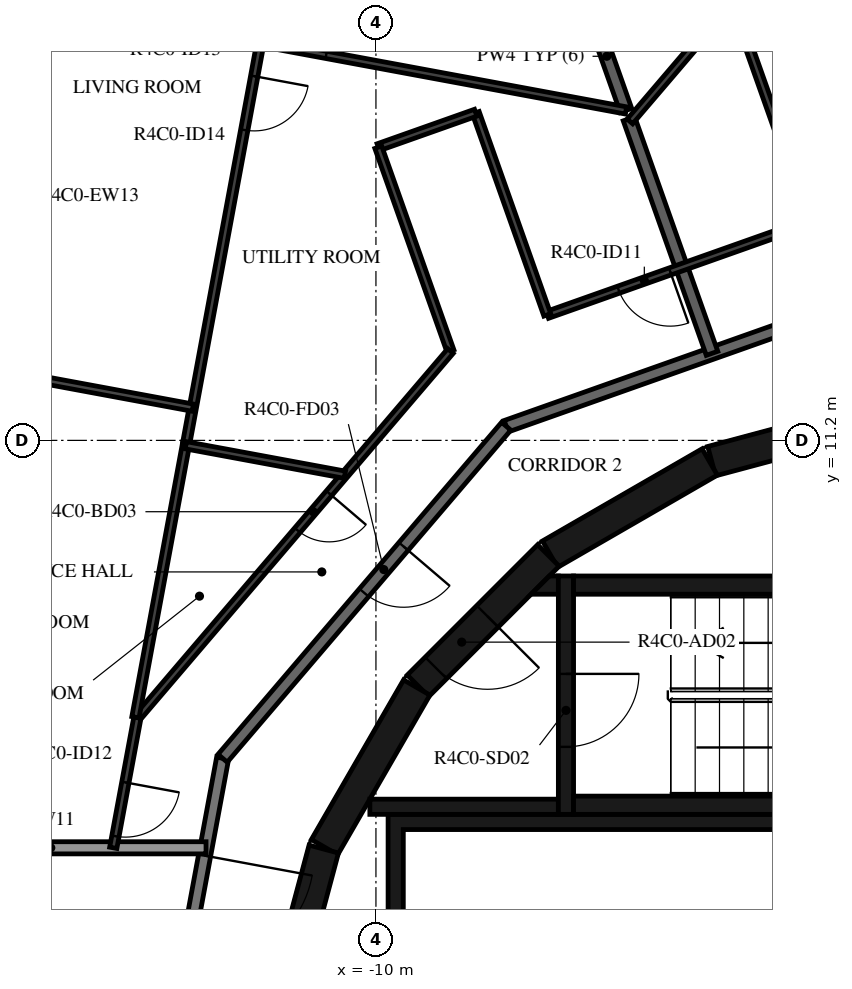
"""IFC4 building model, lengths in metres.
Left out: names, types, materials, properties, quantities, classifications, styles, units other than length and angle.
Written with IfcOpenShell. Run it as: python <this file> out.ifc"""

import sys

from ifc_helpers import new_model, si_unit, direction, frame, frame_2d, origin, place, context, subcontext, project, spatial, polyline, rectangle, outline, extrude, element, fill, save


model = new_model("IFC4")
c1 = context("Model", 3, precision=1e-05, world=origin(), true_north=direction((0.0, 1.0)))
c2 = subcontext(c1, "Body", "Model", "MODEL_VIEW")
j1 = project(units=[si_unit("LENGTHUNIT", "METRE"), si_unit("PLANEANGLEUNIT", "RADIAN")], contexts=[c1])
p1 = place(None, origin())
s1 = spatial("IfcSite", under=j1, at=p1, CompositionType="ELEMENT")
p2 = place(p1, origin())
s2 = spatial("IfcBuilding", under=s1, at=p2, CompositionType="ELEMENT")
p3 = place(p2, frame((0.0, 0.0, 172.7)))
s3 = spatial("IfcBuildingStorey", under=s2, at=p3, CompositionType="ELEMENT", Elevation=172.7)
for number, where, z_axis, x_axis in (
    (1, (-1.55, 11.643, 0.0), (0.0, 0.0, 1.0), (-0.966, -0.259, 0.0)),
    (2, (-4.51, 10.845, 0.0), (0.0, 0.0, 1.0), (-0.866, -0.5, 0.0)),
):
    element("IfcWall", number, at=place(p3, frame(where, z_axis=z_axis, x_axis=x_axis)), inside=s3, PredefinedType="SHEAR", context=c2, shape_type="SweptSolid", body=[
        extrude(rectangle(XDim=3.033, YDim=0.5, at=frame_2d((1.516, 0.0))), origin(), (0.0, 0.0, 1.0), 3.12),
    ])
p4 = place(p3, frame((-7.164, 9.308, 0.0), z_axis=(0.0, 0.0, 1.0), x_axis=(-0.707106781187, -0.707106781187, 0.0)))
e3 = element("IfcWall", 3, at=p4, inside=s3, PredefinedType="SHEAR", context=c2, shape_type="SweptSolid", body=[
    extrude(rectangle(XDim=3.032, YDim=0.5, at=frame_2d((1.516, 0.0))), origin(), (0.0, 0.0, 1.0), 3.12),
])
p5 = place(p4, frame((1.416, 0.0, 0.0)))
e4 = element("IfcOpeningElement", 4, at=p5, cuts=e3, PredefinedType="OPENING", context=c2, shape_type="SweptSolid", body=[
    extrude(rectangle(XDim=1.2, YDim=2.1, at=frame_2d((0.6, 1.05))), frame((0.0, 0.26, 0.0), z_axis=(0.0, -1.0, 0.0), x_axis=(1.0, 0.0, 0.0)), (0.0, 0.0, 1.0), 0.52),
])
for number, where, z_axis, x_axis in (
    (5, (-9.329, 7.137, 0.0), (0.0, 0.0, 1.0), (-0.5, -0.866, 0.0)),
    (6, (-10.858, 4.479, 0.0), (0.0, 0.0, 1.0), (-0.259, -0.966, 0.0)),
):
    element("IfcWall", number, at=place(p3, frame(where, z_axis=z_axis, x_axis=x_axis)), inside=s3, PredefinedType="SHEAR", context=c2, shape_type="SweptSolid", body=[
        extrude(rectangle(XDim=3.033, YDim=0.5, at=frame_2d((1.516, 0.0))), origin(), (0.0, 0.0, 1.0), 3.12),
    ])
for number, where, z_axis, x_axis in (
    (7, (-6.75, 5.2, 0.0), (0.0, 0.0, 1.0), (1.0, 0.0, 0.0)),
    (8, (-6.75, 8.82, 0.0), (0.0, 0.0, 1.0), (1.0, 0.0, 0.0)),
):
    element("IfcWall", number, at=place(p3, frame(where, z_axis=z_axis, x_axis=x_axis)), inside=s3, PredefinedType="SHEAR", context=c2, shape_type="SweptSolid", body=[
        extrude(rectangle(XDim=6.75, YDim=0.3, at=frame_2d((3.375, 0.0))), origin(), (0.0, 0.0, 1.0), 3.12),
    ])
p6 = place(p3, frame((-6.875, 8.97, 0.0), z_axis=(0.0, 0.0, 1.0), x_axis=(0.0, -1.0, 0.0)))
e9 = element("IfcWall", 9, at=p6, inside=s3, PredefinedType="SHEAR", context=c2, shape_type="SweptSolid", body=[
    extrude(rectangle(XDim=3.92, YDim=0.25, at=frame_2d((1.96, 0.0))), origin(), (0.0, 0.0, 1.0), 3.12),
])
p7 = place(p6, frame((1.61, 0.0, 0.0)))
e10 = element("IfcOpeningElement", 10, at=p7, cuts=e9, PredefinedType="OPENING", context=c2, shape_type="SweptSolid", body=[
    extrude(rectangle(XDim=1.2, YDim=2.1, at=frame_2d((0.6, 1.05))), frame((0.0, 0.135, 0.0), z_axis=(0.0, -1.0, 0.0), x_axis=(1.0, 0.0, 0.0)), (0.0, 0.0, 1.0), 0.27),
])
p8 = place(p3, frame((-7.0, 5.175, 0.0), z_axis=(0.0, 0.0, 1.0), x_axis=(-1.0, 0.0, 0.0)))
e11 = element("IfcWall", 11, at=p8, inside=s3, PredefinedType="SHEAR", context=c2, shape_type="SweptSolid", body=[
    extrude(rectangle(XDim=3.1, YDim=0.25, at=frame_2d((1.55, 0.0))), origin(), (0.0, 0.0, 1.0), 3.12),
])
p9 = place(p3, origin())
e12 = element("IfcWall", 12, at=p9, inside=s3, PredefinedType="SHEAR", context=c2, shape_type="SweptSolid", body=[
    extrude(outline(polyline([(-7.148, 8.97), (-7.0, 8.97), (-7.0, 8.67), (-7.448, 8.67), (-7.148, 8.97)])), origin(), (0.0, 0.0, 1.0), 3.12),
])
p10 = place(p3, origin())
e13 = element("IfcWall", 13, at=p10, inside=s3, PredefinedType="SHEAR", context=c2, shape_type="SweptSolid", body=[
    extrude(outline(polyline([(-9.55, 4.8), (-1.2, 4.8), (-1.2, 1.9), (-0.95, 1.9), (-0.95, 4.8), (0.95, 4.8), (0.95, 1.9), (1.2, 1.9), (1.2, 4.8), (3.1, 4.8), (3.1, 1.9), (3.35, 1.9), (3.35, 4.8), (5.25, 4.8), (5.25, 1.9), (5.5, 1.9), (5.5, 4.8), (7.4, 4.8), (7.4, 1.9), (7.65, 1.9), (7.65, 4.8), (9.55, 4.8), (9.55, 1.9), (9.8, 1.9), (9.8, 4.8), (9.8, 5.05), (-9.8, 5.05), (-9.8, 4.8), (-9.8, 1.9), (-9.55, 1.9), (-9.55, 4.8)])), origin(), (0.0, 0.0, 1.0), 3.12),
])
p11 = place(p3, frame((-12.521, 5.972, 0.0), z_axis=(0.0, 0.0, 1.0), x_axis=(-0.182251559718, -0.983251935661, 0.0)))
e14 = element("IfcWall", 14, at=p11, inside=s3, PredefinedType="STANDARD", context=c2, shape_type="SweptSolid", body=[
    extrude(rectangle(XDim=5.117, YDim=0.2, at=frame_2d((2.559, 0.0))), origin(), (0.0, 0.0, 1.0), 3.12),
])
p12 = place(p11, frame((1.627, 0.0, 0.0)))
e15 = element("IfcOpeningElement", 15, at=p12, cuts=e14, PredefinedType="OPENING", context=c2, shape_type="SweptSolid", body=[
    extrude(rectangle(XDim=1.8, YDim=2.1, at=frame_2d((0.9, 1.05))), frame((0.0, 0.11, 0.0), z_axis=(0.0, -1.0, 0.0), x_axis=(1.0, 0.0, 0.0)), (0.0, 0.0, 1.0), 0.22),
])
p13 = place(p3, frame((-2.359, 13.38, 0.0), z_axis=(0.0, 0.0, 1.0), x_axis=(-0.942647529236, -0.333789807551, 0.0)))
e16 = element("IfcWall", 16, at=p13, inside=s3, PredefinedType="STANDARD", context=c2, shape_type="SweptSolid", body=[
    extrude(rectangle(XDim=5.833, YDim=0.2, at=frame_2d((2.917, 0.0))), origin(), (0.0, 0.0, 1.0), 3.12),
])
p14 = place(p3, frame((-7.858, 11.433, 0.0), z_axis=(0.0, 0.0, 1.0), x_axis=(-0.649440801937, -0.760412154545, 0.0)))
e17 = element("IfcWall", 17, at=p14, inside=s3, PredefinedType="STANDARD", context=c2, shape_type="SweptSolid", body=[
    extrude(rectangle(XDim=7.181, YDim=0.2, at=frame_2d((3.59, 0.0))), origin(), (0.0, 0.0, 1.0), 3.12),
])
p15 = place(p14, frame((2.6, 0.0, 0.0)))
e18 = element("IfcOpeningElement", 18, at=p15, cuts=e17, PredefinedType="OPENING", context=c2, shape_type="SweptSolid", body=[
    extrude(rectangle(XDim=1.0, YDim=2.1, at=frame_2d((0.5, 1.05))), frame((0.0, 0.11, 0.0), z_axis=(0.0, -1.0, 0.0), x_axis=(1.0, 0.0, 0.0)), (0.0, 0.0, 1.0), 0.22),
])
p16 = place(p3, frame((-12.794, 4.5, 0.0), z_axis=(0.0, 0.0, 1.0), x_axis=(-1.0, 0.0, 0.0)))
e19 = element("IfcWall", 19, at=p16, inside=s3, PredefinedType="STANDARD", context=c2, shape_type="SweptSolid", body=[
    extrude(rectangle(XDim=5.106, YDim=0.2, at=frame_2d((2.553, 0.0))), origin(), (0.0, 0.0, 1.0), 2.73),
])
p17 = place(p3, frame((-5.839, 16.488, 0.0), z_axis=(0.0, 0.0, 1.0), x_axis=(0.333840515054, -0.942629572265, 0.0)))
e20 = element("IfcWall", 20, at=p17, inside=s3, PredefinedType="STANDARD", context=c2, shape_type="SweptSolid", body=[
    extrude(rectangle(XDim=4.092, YDim=0.2, at=frame_2d((2.046, 0.0))), origin(), (0.0, 0.0, 1.0), 3.12),
])
p18 = place(p3, frame((-6.518, 18.408, 0.0), z_axis=(0.0, 0.0, 1.0), x_axis=(0.333725210903, -0.942670400303, 0.0)))
e21 = element("IfcWall", 21, at=p18, inside=s3, PredefinedType="STANDARD", context=c2, shape_type="SweptSolid", body=[
    extrude(rectangle(XDim=1.89, YDim=0.2, at=frame_2d((0.945, 0.0))), origin(), (0.0, 0.0, 1.0), 3.12),
])
p19 = place(p3, frame((8.702, 12.206, 0.0), z_axis=(0.0, 0.0, 1.0), x_axis=(-0.760401313718, 0.649453494945, 0.0)))
e22 = element("IfcWall", 22, at=p19, inside=s3, PredefinedType="PARTITIONING", context=c2, shape_type="SweptSolid", body=[
    extrude(rectangle(XDim=16.724, YDim=0.12, at=frame_2d((8.362, 0.0))), origin(), (0.0, 0.0, 1.0), 3.12),
])
p20 = place(p19, frame((0.2, 0.0, 0.0)))
e23 = element("IfcOpeningElement", 23, at=p20, cuts=e22, PredefinedType="OPENING", context=c2, shape_type="SweptSolid", body=[
    extrude(rectangle(XDim=0.9, YDim=2.1, at=frame_2d((0.45, 1.05))), frame((0.0, 0.07, 0.0), z_axis=(0.0, -1.0, 0.0), x_axis=(1.0, 0.0, 0.0)), (0.0, 0.0, 1.0), 0.14),
])
p21 = place(p19, frame((8.02, 0.0, 0.0)))
e24 = element("IfcOpeningElement", 24, at=p21, cuts=e22, PredefinedType="OPENING", context=c2, shape_type="SweptSolid", body=[
    extrude(rectangle(XDim=0.9, YDim=2.1, at=frame_2d((0.45, 1.05))), frame((0.0, 0.07, 0.0), z_axis=(0.0, -1.0, 0.0), x_axis=(1.0, 0.0, 0.0)), (0.0, 0.0, 1.0), 0.14),
])
p22 = place(p19, frame((14.412, 0.0, 0.0)))
e25 = element("IfcOpeningElement", 25, at=p22, cuts=e22, PredefinedType="OPENING", context=c2, shape_type="SweptSolid", body=[
    extrude(rectangle(XDim=0.9, YDim=2.1, at=frame_2d((0.45, 1.05))), frame((0.0, 0.07, 0.0), z_axis=(0.0, -1.0, 0.0), x_axis=(1.0, 0.0, 0.0)), (0.0, 0.0, 1.0), 0.14),
])
p23 = place(p3, frame((-4.021, 18.101, 0.0), z_axis=(0.0, 0.0, 1.0), x_axis=(0.333811035895, -0.942640012048, 0.0)))
e26 = element("IfcWall", 26, at=p23, inside=s3, PredefinedType="PARTITIONING", context=c2, shape_type="SweptSolid", body=[
    extrude(rectangle(XDim=3.505, YDim=0.12, at=frame_2d((1.752, 0.0))), origin(), (0.0, 0.0, 1.0), 3.12),
])
p24 = place(p3, frame((-2.852, 14.797, 0.0), z_axis=(0.0, 0.0, 1.0), x_axis=(-0.942629664375, -0.333840254973, 0.0)))
e27 = element("IfcWall", 27, at=p24, inside=s3, PredefinedType="PARTITIONING", context=c2, shape_type="SweptSolid", body=[
    extrude(rectangle(XDim=4.593, YDim=0.12, at=frame_2d((2.297, 0.0))), origin(), (0.0, 0.0, 1.0), 3.12),
])
p25 = place(p24, frame((2.451, 0.0, 0.0)))
e28 = element("IfcOpeningElement", 28, at=p25, cuts=e27, PredefinedType="OPENING", context=c2, shape_type="SweptSolid", body=[
    extrude(rectangle(XDim=0.9, YDim=2.1, at=frame_2d((0.45, 1.05))), frame((0.0, 0.07, 0.0), z_axis=(0.0, -1.0, 0.0), x_axis=(1.0, 0.0, 0.0)), (0.0, 0.0, 1.0), 0.14),
])
p26 = place(p3, frame((-1.79, 21.167, 0.0), z_axis=(0.0, 0.0, 1.0), x_axis=(-0.649456490412, -0.7603987553, 0.0)))
e29 = element("IfcWall", 29, at=p26, inside=s3, PredefinedType="PARTITIONING", context=c2, shape_type="SweptSolid", body=[
    extrude(rectangle(XDim=6.21, YDim=0.12, at=frame_2d((3.105, 0.0))), origin(), (0.0, 0.0, 1.0), 3.12),
])
p27 = place(p26, frame((0.2, 0.0, 0.0)))
e30 = element("IfcOpeningElement", 30, at=p27, cuts=e29, PredefinedType="OPENING", context=c2, shape_type="SweptSolid", body=[
    extrude(rectangle(XDim=0.9, YDim=2.1, at=frame_2d((0.45, 1.05))), frame((0.0, 0.07, 0.0), z_axis=(0.0, -1.0, 0.0), x_axis=(1.0, 0.0, 0.0)), (0.0, 0.0, 1.0), 0.14),
])
p28 = place(p3, frame((-7.181, 13.263, 0.0), z_axis=(0.0, 0.0, 1.0), x_axis=(-0.333822798183, 0.942635846663, 0.0)))
e31 = element("IfcWall", 31, at=p28, inside=s3, PredefinedType="PARTITIONING", context=c2, shape_type="SweptSolid", body=[
    extrude(rectangle(XDim=3.527, YDim=0.12, at=frame_2d((1.764, 0.0))), origin(), (0.0, 0.0, 1.0), 3.12),
])
p29 = place(p3, frame((-8.359, 16.588, 0.0), z_axis=(0.0, 0.0, 1.0), x_axis=(-0.942661115325, -0.333751436931, 0.0)))
e32 = element("IfcWall", 32, at=p29, inside=s3, PredefinedType="PARTITIONING", context=c2, shape_type="SweptSolid", body=[
    extrude(rectangle(XDim=1.7, YDim=0.12, at=frame_2d((0.85, 0.0))), origin(), (0.0, 0.0, 1.0), 3.12),
])
p30 = place(p3, frame((-9.961, 16.021, 0.0), z_axis=(0.0, 0.0, 1.0), x_axis=(0.333803930912, -0.94264252806, 0.0)))
e33 = element("IfcWall", 33, at=p30, inside=s3, PredefinedType="PARTITIONING", context=c2, shape_type="SweptSolid", body=[
    extrude(rectangle(XDim=3.556, YDim=0.12, at=frame_2d((1.778, 0.0))), origin(), (0.0, 0.0, 1.0), 3.12),
])
p31 = place(p3, frame((-8.774, 12.669, 0.0), z_axis=(0.0, 0.0, 1.0), x_axis=(-0.649446157105, -0.760407580855, 0.0)))
e34 = element("IfcWall", 34, at=p31, inside=s3, PredefinedType="PARTITIONING", context=c2, shape_type="SweptSolid", body=[
    extrude(rectangle(XDim=7.927, YDim=0.12, at=frame_2d((3.964, 0.0))), origin(), (0.0, 0.0, 1.0), 3.12),
])
p32 = place(p31, frame((3.074, 0.0, 0.0)))
e35 = element("IfcOpeningElement", 35, at=p32, cuts=e34, PredefinedType="OPENING", context=c2, shape_type="SweptSolid", body=[
    extrude(rectangle(XDim=0.8, YDim=2.1, at=frame_2d((0.4, 1.05))), frame((0.0, 0.07, 0.0), z_axis=(0.0, -1.0, 0.0), x_axis=(1.0, 0.0, 0.0)), (0.0, 0.0, 1.0), 0.14),
])
p33 = place(p3, frame((-13.923, 6.641, 0.0), z_axis=(0.0, 0.0, 1.0), x_axis=(-0.182209715759, -0.983259690765, 0.0)))
e36 = element("IfcWall", 36, at=p33, inside=s3, PredefinedType="PARTITIONING", context=c2, shape_type="SweptSolid", body=[
    extrude(rectangle(XDim=2.177, YDim=0.12, at=frame_2d((1.089, 0.0))), origin(), (0.0, 0.0, 1.0), 3.12),
])
p34 = place(p33, frame((1.083, 0.0, 0.0)))
e37 = element("IfcOpeningElement", 37, at=p34, cuts=e36, PredefinedType="OPENING", context=c2, shape_type="SweptSolid", body=[
    extrude(rectangle(XDim=0.9, YDim=2.1, at=frame_2d((0.45, 1.05))), frame((0.0, 0.07, 0.0), z_axis=(0.0, -1.0, 0.0), x_axis=(1.0, 0.0, 0.0)), (0.0, 0.0, 1.0), 0.14),
])
p35 = place(p3, frame((-13.955, 6.647, 0.0), z_axis=(0.0, 0.0, 1.0), x_axis=(0.182264522222, 0.983249532896, 0.0)))
e38 = element("IfcWall", 38, at=p35, inside=s3, PredefinedType="PARTITIONING", context=c2, shape_type="SweptSolid", body=[
    extrude(rectangle(XDim=4.589, YDim=0.12, at=frame_2d((2.294, 0.0))), origin(), (0.0, 0.0, 1.0), 3.12),
])
p36 = place(p3, frame((-11.899, 17.74, 0.0), z_axis=(0.0, 0.0, 1.0), x_axis=(0.983254721409, -0.182236529889, 0.0)))
e39 = element("IfcWall", 39, at=p36, inside=s3, PredefinedType="PARTITIONING", context=c2, shape_type="SweptSolid", body=[
    extrude(rectangle(XDim=6.114, YDim=0.12, at=frame_2d((3.057, 0.0))), origin(), (0.0, 0.0, 1.0), 3.12),
])
p37 = place(p36, frame((0.2, 0.0, 0.0)))
e40 = element("IfcOpeningElement", 40, at=p37, cuts=e39, PredefinedType="OPENING", context=c2, shape_type="SweptSolid", body=[
    extrude(rectangle(XDim=0.9, YDim=2.1, at=frame_2d((0.45, 1.05))), frame((0.0, 0.07, 0.0), z_axis=(0.0, -1.0, 0.0), x_axis=(1.0, 0.0, 0.0)), (0.0, 0.0, 1.0), 0.14),
])
p38 = place(p3, frame((-11.396, 20.453, 0.0), z_axis=(0.0, 0.0, 1.0), x_axis=(-0.182223370439, -0.983257160292, 0.0)))
e41 = element("IfcWall", 41, at=p38, inside=s3, PredefinedType="PARTITIONING", context=c2, shape_type="SweptSolid", body=[
    extrude(rectangle(XDim=9.452, YDim=0.12, at=frame_2d((4.726, 0.0))), origin(), (0.0, 0.0, 1.0), 3.12),
])
p39 = place(p38, frame((3.319, 0.0, 0.0)))
e42 = element("IfcOpeningElement", 42, at=p39, cuts=e41, PredefinedType="OPENING", context=c2, shape_type="SweptSolid", body=[
    extrude(rectangle(XDim=0.9, YDim=2.1, at=frame_2d((0.45, 1.05))), frame((0.0, 0.07, 0.0), z_axis=(0.0, -1.0, 0.0), x_axis=(1.0, 0.0, 0.0)), (0.0, 0.0, 1.0), 0.14),
])
p40 = place(p38, frame((0.2, 0.0, 0.0)))
e43 = element("IfcOpeningElement", 43, at=p40, cuts=e41, PredefinedType="OPENING", context=c2, shape_type="SweptSolid", body=[
    extrude(rectangle(XDim=0.9, YDim=2.1, at=frame_2d((0.45, 1.05))), frame((0.0, 0.07, 0.0), z_axis=(0.0, -1.0, 0.0), x_axis=(1.0, 0.0, 0.0)), (0.0, 0.0, 1.0), 0.14),
])
p41 = place(p3, frame((-13.126, 11.12, 0.0), z_axis=(0.0, 0.0, 1.0), x_axis=(0.983257646361, -0.182220747645, 0.0)))
e44 = element("IfcWall", 44, at=p41, inside=s3, PredefinedType="PARTITIONING", context=c2, shape_type="SweptSolid", body=[
    extrude(rectangle(XDim=2.659, YDim=0.12, at=frame_2d((1.33, 0.0))), origin(), (0.0, 0.0, 1.0), 3.12),
])
p42 = place(p3, frame((-16.552, 12.394, 0.0), z_axis=(0.0, 0.0, 1.0), x_axis=(0.983257712156, -0.182220392618, 0.0)))
e45 = element("IfcWall", 45, at=p42, inside=s3, PredefinedType="PARTITIONING", context=c2, shape_type="SweptSolid", body=[
    extrude(rectangle(XDim=3.6, YDim=0.12, at=frame_2d((1.8, 0.0))), origin(), (0.0, 0.0, 1.0), 2.73),
])
p43 = place(p7, origin())
e46 = element("IfcDoor", 46, at=p43, inside=s3, OperationType="SINGLE_SWING_LEFT", PredefinedType="DOOR", context=c2, shape_type="SweptSolid", body=[
    extrude(rectangle(XDim=1.2, YDim=2.1, at=frame_2d((0.6, 1.05))), frame((0.0, 0.025, 0.0), z_axis=(0.0, -1.0, 0.0), x_axis=(1.0, 0.0, 0.0)), (0.0, 0.0, 1.0), 0.05),
])
fill(e10, e46)
p44 = place(p5, origin())
e47 = element("IfcDoor", 47, at=p44, inside=s3, OperationType="SINGLE_SWING_RIGHT", PredefinedType="DOOR", context=c2, shape_type="SweptSolid", body=[
    extrude(rectangle(XDim=1.2, YDim=2.1, at=frame_2d((0.6, 1.05))), frame((0.0, 0.025, 0.0), z_axis=(0.0, -1.0, 0.0), x_axis=(1.0, 0.0, 0.0)), (0.0, 0.0, 1.0), 0.05),
])
fill(e4, e47)
p45 = place(p15, origin())
e48 = element("IfcDoor", 48, at=p45, inside=s3, OperationType="SINGLE_SWING_LEFT", PredefinedType="DOOR", context=c2, shape_type="SweptSolid", body=[
    extrude(rectangle(XDim=1.0, YDim=2.1, at=frame_2d((0.5, 1.05))), frame((0.0, 0.025, 0.0), z_axis=(0.0, -1.0, 0.0), x_axis=(1.0, 0.0, 0.0)), (0.0, 0.0, 1.0), 0.05),
])
fill(e18, e48)
p46 = place(p25, origin())
e49 = element("IfcDoor", 49, at=p46, inside=s3, OperationType="SINGLE_SWING_LEFT", PredefinedType="DOOR", context=c2, shape_type="SweptSolid", body=[
    extrude(rectangle(XDim=0.9, YDim=2.1, at=frame_2d((0.45, 1.05))), frame((0.0, 0.025, 0.0), z_axis=(0.0, -1.0, 0.0), x_axis=(1.0, 0.0, 0.0)), (0.0, 0.0, 1.0), 0.05),
])
fill(e28, e49)
p47 = place(p32, origin())
e50 = element("IfcDoor", 50, at=p47, inside=s3, OperationType="SINGLE_SWING_LEFT", PredefinedType="DOOR", context=c2, shape_type="SweptSolid", body=[
    extrude(rectangle(XDim=0.8, YDim=2.1, at=frame_2d((0.4, 1.05))), frame((0.0, 0.025, 0.0), z_axis=(0.0, -1.0, 0.0), x_axis=(1.0, 0.0, 0.0)), (0.0, 0.0, 1.0), 0.05),
])
fill(e35, e50)
p48 = place(p34, origin())
e51 = element("IfcDoor", 51, at=p48, inside=s3, OperationType="SINGLE_SWING_LEFT", PredefinedType="DOOR", context=c2, shape_type="SweptSolid", body=[
    extrude(rectangle(XDim=0.9, YDim=2.1, at=frame_2d((0.45, 1.05))), frame((0.0, 0.025, 0.0), z_axis=(0.0, -1.0, 0.0), x_axis=(1.0, 0.0, 0.0)), (0.0, 0.0, 1.0), 0.05),
])
fill(e37, e51)
p49 = place(p37, origin())
e52 = element("IfcDoor", 52, at=p49, inside=s3, OperationType="SINGLE_SWING_LEFT", PredefinedType="DOOR", context=c2, shape_type="SweptSolid", body=[
    extrude(rectangle(XDim=0.9, YDim=2.1, at=frame_2d((0.45, 1.05))), frame((0.0, 0.025, 0.0), z_axis=(0.0, -1.0, 0.0), x_axis=(1.0, 0.0, 0.0)), (0.0, 0.0, 1.0), 0.05),
])
fill(e40, e52)
p50 = place(p39, origin())
e53 = element("IfcDoor", 53, at=p50, inside=s3, OperationType="SINGLE_SWING_LEFT", PredefinedType="DOOR", context=c2, shape_type="SweptSolid", body=[
    extrude(rectangle(XDim=0.9, YDim=2.1, at=frame_2d((0.45, 1.05))), frame((0.0, 0.025, 0.0), z_axis=(0.0, -1.0, 0.0), x_axis=(1.0, 0.0, 0.0)), (0.0, 0.0, 1.0), 0.05),
])
fill(e42, e53)
p51 = place(p12, origin())
e54 = element("IfcDoor", 54, at=p51, inside=s3, OperationType="DOUBLE_DOOR_SINGLE_SWING", PredefinedType="DOOR", context=c2, shape_type="SweptSolid", body=[
    extrude(rectangle(XDim=1.8, YDim=2.1, at=frame_2d((0.9, 1.05))), frame((0.0, 0.025, 0.0), z_axis=(0.0, -1.0, 0.0), x_axis=(1.0, 0.0, 0.0)), (0.0, 0.0, 1.0), 0.05),
])
fill(e15, e54)
save(model, sys.argv[1])
